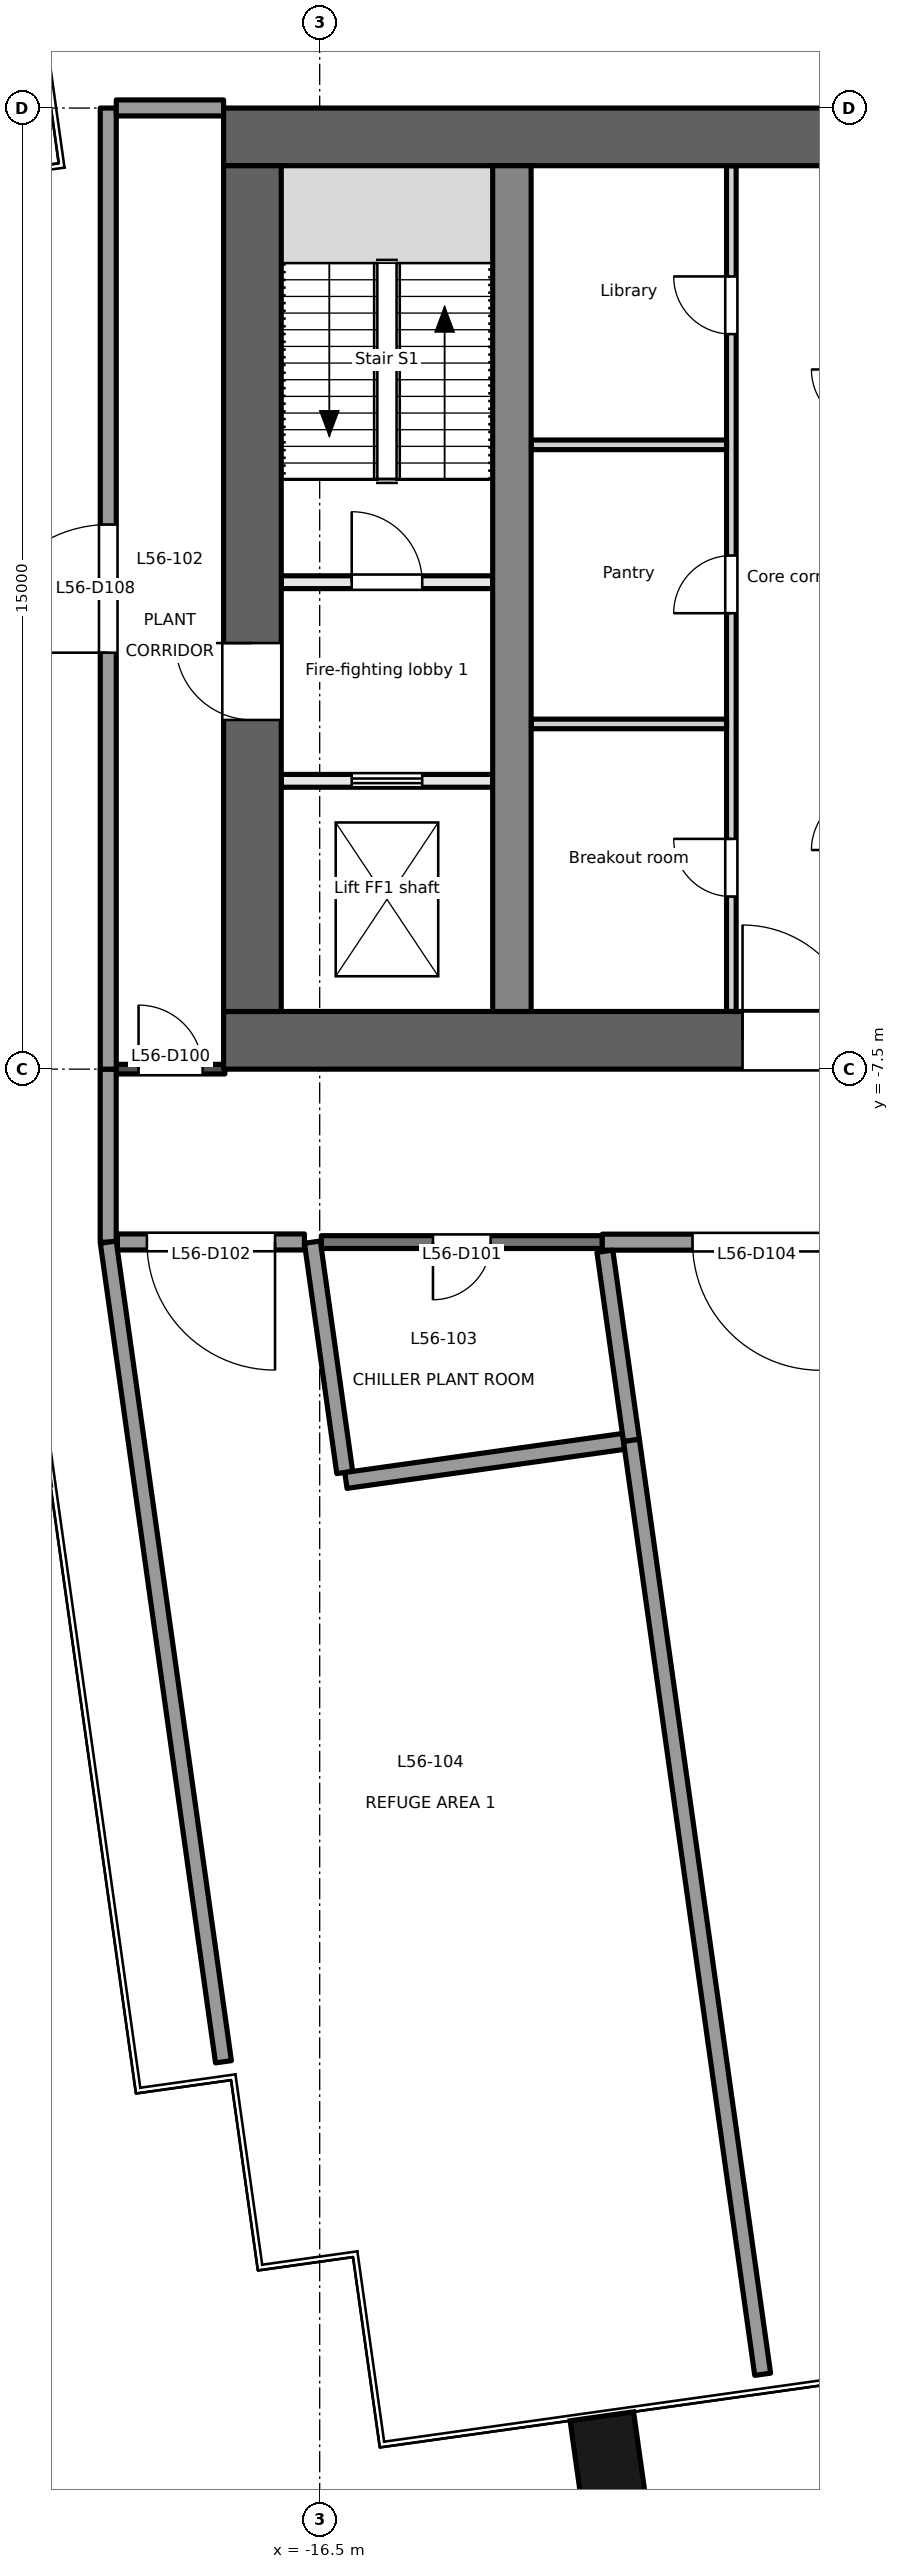
"""IFC4 building model, lengths in metres.
Left out: names, types, materials, properties, quantities, classifications, styles, units other than length and angle.
Written with IfcOpenShell. Run it as: python <this file> out.ifc"""

import sys

from ifc_helpers import new_model, si_unit, direction, frame, frame_2d, origin, origin_2d, place, context, subcontext, project, spatial, rectangle, extrude, element, fill, save


model = new_model("IFC4")
c1 = context("Model", 3, precision=1e-05, world=origin(), true_north=direction((0.0, 1.0)))
c2 = subcontext(c1, "Body", "Model", "MODEL_VIEW")
j1 = project(units=[si_unit("LENGTHUNIT", "METRE"), si_unit("PLANEANGLEUNIT", "RADIAN")], contexts=[c1])
p1 = place(None, origin())
s1 = spatial("IfcSite", under=j1, at=p1, CompositionType="ELEMENT")
p2 = place(p1, origin())
s2 = spatial("IfcBuilding", under=s1, at=p2, CompositionType="ELEMENT")
p3 = place(p2, frame((0.0, 0.0, 244.7)))
s3 = spatial("IfcBuildingStorey", under=s2, at=p3, CompositionType="ELEMENT", Elevation=244.7)
p4 = place(p3, frame((-11.971, -29.416, -0.2), z_axis=(0.0, 0.0, 1.0), x_axis=(0.990268068742, 0.13917310096, 0.0)))
e1 = element("IfcColumn", 1, at=p4, inside=s3, PredefinedType="COLUMN", context=c2, shape_type="SweptSolid", body=[
    extrude(rectangle(XDim=1.0, YDim=1.8, at=origin_2d()), origin(), (0.0, 0.0, 1.0), 5.0),
])
p5 = place(p3, frame((-18.0, -7.05, -0.2), z_axis=(0.0, 0.0, 1.0), x_axis=(1.0, 0.0, 0.0)))
e2 = element("IfcWall", 2, at=p5, inside=s3, PredefinedType="SHEAR", context=c2, shape_type="SweptSolid", body=[
    extrude(rectangle(XDim=36.0, YDim=0.9, at=frame_2d((18.0, 0.0))), origin(), (0.0, 0.0, 1.0), 5.0),
])
p6 = place(p5, frame((8.1, 0.0, 0.2)))
e3 = element("IfcOpeningElement", 3, at=p6, cuts=e2, PredefinedType="OPENING", context=c2, shape_type="SweptSolid", body=[
    extrude(rectangle(XDim=1.8, YDim=2.1, at=frame_2d((0.9, 1.05))), frame((0.0, 0.46, 0.0), z_axis=(0.0, -1.0, 0.0), x_axis=(1.0, 0.0, 0.0)), (0.0, 0.0, 1.0), 0.921),
])
p7 = place(p5, frame((16.8, 0.0, 0.2)))
e4 = element("IfcOpeningElement", 4, at=p7, cuts=e2, PredefinedType="OPENING", context=c2, shape_type="SweptSolid", body=[
    extrude(rectangle(XDim=2.4, YDim=2.1, at=frame_2d((1.2, 1.05))), frame((0.0, 0.46, 0.0), z_axis=(0.0, -1.0, 0.0), x_axis=(1.0, 0.0, 0.0)), (0.0, 0.0, 1.0), 0.921),
])
p8 = place(p5, frame((26.1, 0.0, 0.2)))
e5 = element("IfcOpeningElement", 5, at=p8, cuts=e2, PredefinedType="OPENING", context=c2, shape_type="SweptSolid", body=[
    extrude(rectangle(XDim=2.4, YDim=2.1, at=frame_2d((1.2, 1.05))), frame((0.0, 0.46, 0.0), z_axis=(0.0, -1.0, 0.0), x_axis=(1.0, 0.0, 0.0)), (0.0, 0.0, 1.0), 0.921),
])
p9 = place(p3, frame((-18.0, 7.05, -0.2), z_axis=(0.0, 0.0, 1.0), x_axis=(1.0, 0.0, 0.0)))
e6 = element("IfcWall", 6, at=p9, inside=s3, PredefinedType="SHEAR", context=c2, shape_type="SweptSolid", body=[
    extrude(rectangle(XDim=36.0, YDim=0.9, at=frame_2d((18.0, 0.0))), origin(), (0.0, 0.0, 1.0), 5.0),
])
p10 = place(p3, frame((-17.55, -6.6, -0.2), z_axis=(0.0, 0.0, 1.0), x_axis=(0.0, 1.0, 0.0)))
e7 = element("IfcWall", 7, at=p10, inside=s3, PredefinedType="SHEAR", context=c2, shape_type="SweptSolid", body=[
    extrude(rectangle(XDim=13.2, YDim=0.9, at=frame_2d((6.6, 0.0))), origin(), (0.0, 0.0, 1.0), 5.0),
])
p11 = place(p10, frame((4.55, 0.0, 0.2)))
e8 = element("IfcOpeningElement", 8, at=p11, cuts=e7, PredefinedType="OPENING", context=c2, shape_type="SweptSolid", body=[
    extrude(rectangle(XDim=1.2, YDim=2.1, at=frame_2d((0.6, 1.05))), frame((0.0, 0.46, 0.0), z_axis=(0.0, -1.0, 0.0), x_axis=(1.0, 0.0, 0.0)), (0.0, 0.0, 1.0), 0.921),
])
p12 = place(p3, frame((-13.5, -6.6, -0.2), z_axis=(0.0, 0.0, 1.0), x_axis=(0.0, 1.0, 0.0)))
e9 = element("IfcWall", 9, at=p12, inside=s3, PredefinedType="SHEAR", context=c2, shape_type="SweptSolid", body=[
    extrude(rectangle(XDim=13.2, YDim=0.6, at=frame_2d((6.6, 0.0))), origin(), (0.0, 0.0, 1.0), 5.0),
])
p13 = place(p3, frame((-17.1, -3.0, 0.0), z_axis=(0.0, 0.0, 1.0), x_axis=(1.0, 0.0, 0.0)))
e10 = element("IfcWall", 10, at=p13, inside=s3, PredefinedType="PARTITIONING", context=c2, shape_type="SweptSolid", body=[
    extrude(rectangle(XDim=3.3, YDim=0.2, at=frame_2d((1.65, 0.0))), origin(), (0.0, 0.0, 1.0), 4.8),
])
p14 = place(p13, frame((1.1, 0.0, 0.0)))
e11 = element("IfcOpeningElement", 11, at=p14, cuts=e10, PredefinedType="OPENING", context=c2, shape_type="SweptSolid", body=[
    extrude(rectangle(XDim=1.1, YDim=2.1, at=frame_2d((0.55, 1.05))), frame((0.0, 0.111, 0.0), z_axis=(0.0, -1.0, 0.0), x_axis=(1.0, 0.0, 0.0)), (0.0, 0.0, 1.0), 0.221),
])
p15 = place(p3, frame((-17.1, 0.1, 0.0), z_axis=(0.0, 0.0, 1.0), x_axis=(1.0, 0.0, 0.0)))
e12 = element("IfcWall", 12, at=p15, inside=s3, PredefinedType="PARTITIONING", context=c2, shape_type="SweptSolid", body=[
    extrude(rectangle(XDim=3.3, YDim=0.2, at=frame_2d((1.65, 0.0))), origin(), (0.0, 0.0, 1.0), 4.8),
])
p16 = place(p15, frame((1.1, 0.0, 0.0)))
e13 = element("IfcOpeningElement", 13, at=p16, cuts=e12, PredefinedType="OPENING", context=c2, shape_type="SweptSolid", body=[
    extrude(rectangle(XDim=1.1, YDim=2.1, at=frame_2d((0.55, 1.05))), frame((0.0, 0.111, 0.0), z_axis=(0.0, -1.0, 0.0), x_axis=(1.0, 0.0, 0.0)), (0.0, 0.0, 1.0), 0.221),
])
p17 = place(p3, frame((-10.075, -6.6, 0.0), z_axis=(0.0, 0.0, 1.0), x_axis=(0.0, 1.0, 0.0)))
e14 = element("IfcWall", 14, at=p17, inside=s3, PredefinedType="PARTITIONING", context=c2, shape_type="SweptSolid", body=[
    extrude(rectangle(XDim=13.2, YDim=0.15, at=frame_2d((6.6, 0.0))), origin(), (0.0, 0.0, 1.0), 4.8),
])
p18 = place(p17, frame((1.794, 0.0, 0.0)))
e15 = element("IfcOpeningElement", 15, at=p18, cuts=e14, PredefinedType="OPENING", context=c2, shape_type="SweptSolid", body=[
    extrude(rectangle(XDim=0.9, YDim=2.1, at=frame_2d((0.45, 1.05))), frame((0.0, 0.085, 0.0), z_axis=(0.0, -1.0, 0.0), x_axis=(1.0, 0.0, 0.0)), (0.0, 0.0, 1.0), 0.171),
])
p19 = place(p17, frame((6.216, 0.0, 0.0)))
e16 = element("IfcOpeningElement", 16, at=p19, cuts=e14, PredefinedType="OPENING", context=c2, shape_type="SweptSolid", body=[
    extrude(rectangle(XDim=0.9, YDim=2.1, at=frame_2d((0.45, 1.05))), frame((0.0, 0.085, 0.0), z_axis=(0.0, -1.0, 0.0), x_axis=(1.0, 0.0, 0.0)), (0.0, 0.0, 1.0), 0.171),
])
p20 = place(p17, frame((10.572, 0.0, 0.0)))
e17 = element("IfcOpeningElement", 17, at=p20, cuts=e14, PredefinedType="OPENING", context=c2, shape_type="SweptSolid", body=[
    extrude(rectangle(XDim=0.9, YDim=2.1, at=frame_2d((0.45, 1.05))), frame((0.0, 0.085, 0.0), z_axis=(0.0, -1.0, 0.0), x_axis=(1.0, 0.0, 0.0)), (0.0, 0.0, 1.0), 0.171),
])
for number, where, z_axis, x_axis in (
    (18, (-13.2, -2.112, 0.0), (0.0, 0.0, 1.0), (1.0, 0.0, 0.0)),
    (19, (-13.2, 2.244, 0.0), (0.0, 0.0, 1.0), (1.0, 0.0, 0.0)),
):
    element("IfcWall", number, at=place(p3, frame(where, z_axis=z_axis, x_axis=x_axis)), inside=s3, PredefinedType="PARTITIONING", context=c2, shape_type="SweptSolid", body=[
        extrude(rectangle(XDim=3.05, YDim=0.15, at=frame_2d((1.525, 0.0))), origin(), (0.0, 0.0, 1.0), 4.8),
    ])
p21 = place(p3, frame((-19.675, -7.5, 0.0), z_axis=(0.0, 0.0, 1.0), x_axis=(1.0, 0.0, 0.0)))
e20 = element("IfcWall", 20, at=p21, inside=s3, PredefinedType="PARTITIONING", context=c2, shape_type="SweptSolid", body=[
    extrude(rectangle(XDim=1.695, YDim=0.15, at=frame_2d((0.848, 0.0))), origin(), (0.0, 0.0, 1.0), 4.8),
])
p22 = place(p21, frame((0.348, 0.0, 0.0)))
e21 = element("IfcOpeningElement", 21, at=p22, cuts=e20, PredefinedType="OPENING", context=c2, shape_type="SweptSolid", body=[
    extrude(rectangle(XDim=1.0, YDim=2.1, at=frame_2d((0.5, 1.05))), frame((0.0, 0.085, 0.0), z_axis=(0.0, -1.0, 0.0), x_axis=(1.0, 0.0, 0.0)), (0.0, 0.0, 1.0), 0.171),
])
p23 = place(p3, frame((-12.089, -10.199, 0.0), z_axis=(0.0, 0.0, 1.0), x_axis=(-1.0, 0.0, 0.0)))
e22 = element("IfcWall", 22, at=p23, inside=s3, PredefinedType="PARTITIONING", context=c2, shape_type="SweptSolid", body=[
    extrude(rectangle(XDim=4.385, YDim=0.2, at=frame_2d((2.192, 0.0))), origin(), (0.0, 0.0, 1.0), 3.9),
])
p24 = place(p23, frame((1.743, 0.0, 0.0)))
e23 = element("IfcOpeningElement", 23, at=p24, cuts=e22, PredefinedType="OPENING", context=c2, shape_type="SweptSolid", body=[
    extrude(rectangle(XDim=0.9, YDim=2.1, at=frame_2d((0.45, 1.05))), frame((0.0, 0.111, 0.0), z_axis=(0.0, -1.0, 0.0), x_axis=(1.0, 0.0, 0.0)), (0.0, 0.0, 1.0), 0.221),
])
p25 = place(p3, frame((-16.738, -10.197, 0.0), z_axis=(0.0, 0.0, 1.0), x_axis=(-1.0, 0.0, 0.0)))
e24 = element("IfcWall", 24, at=p25, inside=s3, PredefinedType="PARTITIONING", context=c2, shape_type="SweptSolid", body=[
    extrude(rectangle(XDim=2.919, YDim=0.25, at=frame_2d((1.459, 0.0))), origin(), (0.0, 0.0, 1.0), 4.8),
])
p26 = place(p25, frame((0.459, 0.0, 0.0)))
e25 = element("IfcOpeningElement", 25, at=p26, cuts=e24, PredefinedType="OPENING", context=c2, shape_type="SweptSolid", body=[
    extrude(rectangle(XDim=2.0, YDim=2.1, at=frame_2d((1.0, 1.05))), frame((0.0, 0.135, 0.0), z_axis=(0.0, -1.0, 0.0), x_axis=(1.0, 0.0, 0.0)), (0.0, 0.0, 1.0), 0.271),
])
p27 = place(p3, frame((-7.272, -10.2, 0.0), z_axis=(0.0, 0.0, 1.0), x_axis=(-1.0, 0.0, 0.0)))
e26 = element("IfcWall", 26, at=p27, inside=s3, PredefinedType="PARTITIONING", context=c2, shape_type="SweptSolid", body=[
    extrude(rectangle(XDim=4.817, YDim=0.25, at=frame_2d((2.409, 0.0))), origin(), (0.0, 0.0, 1.0), 3.9),
])
p28 = place(p27, frame((1.409, 0.0, 0.0)))
e27 = element("IfcOpeningElement", 27, at=p28, cuts=e26, PredefinedType="OPENING", context=c2, shape_type="SweptSolid", body=[
    extrude(rectangle(XDim=2.0, YDim=2.1, at=frame_2d((1.0, 1.05))), frame((0.0, 0.135, 0.0), z_axis=(0.0, -1.0, 0.0), x_axis=(1.0, 0.0, 0.0)), (0.0, 0.0, 1.0), 0.271),
])
p29 = place(p3, frame((-19.801, -10.2, 0.0), z_axis=(0.0, 0.0, 1.0), x_axis=(0.0, 1.0, 0.0)))
e28 = element("IfcWall", 28, at=p29, inside=s3, PredefinedType="PARTITIONING", context=c2, shape_type="SweptSolid", body=[
    extrude(rectangle(XDim=2.7, YDim=0.25, at=frame_2d((1.35, 0.0))), origin(), (0.0, 0.0, 1.0), 4.8),
])
p30 = place(p3, frame((-19.8, -7.5, 0.0), z_axis=(0.0, 0.0, 1.0), x_axis=(0.0, 1.0, 0.0)))
e29 = element("IfcWall", 29, at=p30, inside=s3, PredefinedType="PARTITIONING", context=c2, shape_type="SweptSolid", body=[
    extrude(rectangle(XDim=15.0, YDim=0.25, at=frame_2d((7.5, 0.0))), origin(), (0.0, 0.0, 1.0), 4.44),
])
p31 = place(p30, frame((6.5, 0.0, 0.0)))
e30 = element("IfcOpeningElement", 30, at=p31, cuts=e29, PredefinedType="OPENING", context=c2, shape_type="SweptSolid", body=[
    extrude(rectangle(XDim=2.0, YDim=2.1, at=frame_2d((1.0, 1.05))), frame((0.0, 0.135, 0.0), z_axis=(0.0, -1.0, 0.0), x_axis=(1.0, 0.0, 0.0)), (0.0, 0.0, 1.0), 0.271),
])
p32 = place(p3, frame((-19.675, 7.502, 0.0), z_axis=(0.0, 0.0, 1.0), x_axis=(1.0, 0.0, 0.0)))
e31 = element("IfcWall", 31, at=p32, inside=s3, PredefinedType="PARTITIONING", context=c2, shape_type="SweptSolid", body=[
    extrude(rectangle(XDim=1.675, YDim=0.25, at=frame_2d((0.837, 0.0))), origin(), (0.0, 0.0, 1.0), 4.8),
])
p33 = place(p3, frame((-16.109, -13.795, 0.0), z_axis=(0.0, 0.0, 1.0), x_axis=(-0.139142514574, 0.990272366896, 0.0)))
e32 = element("IfcWall", 32, at=p33, inside=s3, PredefinedType="PARTITIONING", context=c2, shape_type="SweptSolid", body=[
    extrude(rectangle(XDim=3.63, YDim=0.25, at=frame_2d((1.815, 0.0))), origin(), (0.0, 0.0, 1.0), 4.8),
])
p34 = place(p3, frame((-11.758, -13.31, 0.0), z_axis=(0.0, 0.0, 1.0), x_axis=(-0.990270519577, -0.139155661248, 0.0)))
e33 = element("IfcWall", 33, at=p34, inside=s3, PredefinedType="PARTITIONING", context=c2, shape_type="SweptSolid", body=[
    extrude(rectangle(XDim=4.375, YDim=0.25, at=frame_2d((2.188, 0.0))), origin(), (0.0, 0.0, 1.0), 3.9),
])
p35 = place(p3, frame((-12.049, -10.342, 0.0), z_axis=(0.0, 0.0, 1.0), x_axis=(0.139230988623, -0.990259931436, 0.0)))
e34 = element("IfcWall", 34, at=p35, inside=s3, PredefinedType="PARTITIONING", context=c2, shape_type="SweptSolid", body=[
    extrude(rectangle(XDim=2.981, YDim=0.25, at=frame_2d((1.49, 0.0))), origin(), (0.0, 0.0, 1.0), 4.8),
])
p36 = place(p3, frame((-11.634, -13.294, 0.0), z_axis=(0.0, 0.0, 1.0), x_axis=(0.139154438601, -0.990270691386, 0.0)))
e35 = element("IfcWall", 35, at=p36, inside=s3, PredefinedType="PARTITIONING", context=c2, shape_type="SweptSolid", body=[
    extrude(rectangle(XDim=14.718, YDim=0.25, at=frame_2d((7.359, 0.0))), origin(), (0.0, 0.0, 1.0), 3.7),
])
p37 = place(p3, frame((-18.002, -22.992, 0.0), z_axis=(0.0, 0.0, 1.0), x_axis=(-0.139195756807, 0.990264884406, 0.0)))
e36 = element("IfcWall", 36, at=p37, inside=s3, PredefinedType="PARTITIONING", context=c2, shape_type="SweptSolid", body=[
    extrude(rectangle(XDim=12.918, YDim=0.25, at=frame_2d((6.459, 0.0))), origin(), (0.0, 0.0, 1.0), 4.8),
])
p38 = place(p14, origin())
e37 = element("IfcDoor", 37, at=p38, inside=s3, OperationType="DOUBLE_DOOR_SLIDING", PredefinedType="DOOR", context=c2, shape_type="SweptSolid", body=[
    extrude(rectangle(XDim=1.1, YDim=2.1, at=frame_2d((0.55, 1.05))), frame((0.0, 0.025, 0.0), z_axis=(0.0, -1.0, 0.0), x_axis=(1.0, 0.0, 0.0)), (0.0, 0.0, 1.0), 0.05),
])
fill(e11, e37)
p39 = place(p11, origin())
e38 = element("IfcDoor", 38, at=p39, inside=s3, OperationType="SINGLE_SWING_RIGHT", PredefinedType="DOOR", context=c2, shape_type="SweptSolid", body=[
    extrude(rectangle(XDim=1.2, YDim=2.1, at=frame_2d((0.6, 1.05))), frame((0.0, 0.025, 0.0), z_axis=(0.0, -1.0, 0.0), x_axis=(1.0, 0.0, 0.0)), (0.0, 0.0, 1.0), 0.05),
])
fill(e8, e38)
p40 = place(p16, origin())
e39 = element("IfcDoor", 39, at=p40, inside=s3, OperationType="SINGLE_SWING_LEFT", PredefinedType="DOOR", context=c2, shape_type="SweptSolid", body=[
    extrude(rectangle(XDim=1.1, YDim=2.1, at=frame_2d((0.55, 1.05))), frame((0.0, 0.025, 0.0), z_axis=(0.0, -1.0, 0.0), x_axis=(1.0, 0.0, 0.0)), (0.0, 0.0, 1.0), 0.05),
])
fill(e13, e39)
p41 = place(p18, origin())
e40 = element("IfcDoor", 40, at=p41, inside=s3, OperationType="SINGLE_SWING_RIGHT", PredefinedType="DOOR", context=c2, shape_type="SweptSolid", body=[
    extrude(rectangle(XDim=0.9, YDim=2.1, at=frame_2d((0.45, 1.05))), frame((0.0, 0.025, 0.0), z_axis=(0.0, -1.0, 0.0), x_axis=(1.0, 0.0, 0.0)), (0.0, 0.0, 1.0), 0.05),
])
fill(e15, e40)
p42 = place(p19, origin())
e41 = element("IfcDoor", 41, at=p42, inside=s3, OperationType="SINGLE_SWING_LEFT", PredefinedType="DOOR", context=c2, shape_type="SweptSolid", body=[
    extrude(rectangle(XDim=0.9, YDim=2.1, at=frame_2d((0.45, 1.05))), frame((0.0, 0.025, 0.0), z_axis=(0.0, -1.0, 0.0), x_axis=(1.0, 0.0, 0.0)), (0.0, 0.0, 1.0), 0.05),
])
fill(e16, e41)
p43 = place(p20, origin())
e42 = element("IfcDoor", 42, at=p43, inside=s3, OperationType="SINGLE_SWING_RIGHT", PredefinedType="DOOR", context=c2, shape_type="SweptSolid", body=[
    extrude(rectangle(XDim=0.9, YDim=2.1, at=frame_2d((0.45, 1.05))), frame((0.0, 0.025, 0.0), z_axis=(0.0, -1.0, 0.0), x_axis=(1.0, 0.0, 0.0)), (0.0, 0.0, 1.0), 0.05),
])
fill(e17, e42)
p44 = place(p6, origin())
e43 = element("IfcDoor", 43, at=p44, inside=s3, OperationType="SINGLE_SWING_LEFT", PredefinedType="DOOR", context=c2, shape_type="SweptSolid", body=[
    extrude(rectangle(XDim=1.8, YDim=2.1, at=frame_2d((0.9, 1.05))), frame((0.0, 0.025, 0.0), z_axis=(0.0, -1.0, 0.0), x_axis=(1.0, 0.0, 0.0)), (0.0, 0.0, 1.0), 0.05),
])
fill(e3, e43)
p45 = place(p22, origin())
e44 = element("IfcDoor", 44, at=p45, inside=s3, OperationType="SINGLE_SWING_LEFT", PredefinedType="DOOR", context=c2, shape_type="SweptSolid", body=[
    extrude(rectangle(XDim=1.0, YDim=2.1, at=frame_2d((0.5, 1.05))), frame((0.0, 0.025, 0.0), z_axis=(0.0, -1.0, 0.0), x_axis=(1.0, 0.0, 0.0)), (0.0, 0.0, 1.0), 0.05),
])
fill(e21, e44)
p46 = place(p24, origin())
e45 = element("IfcDoor", 45, at=p46, inside=s3, OperationType="SINGLE_SWING_RIGHT", PredefinedType="DOOR", context=c2, shape_type="SweptSolid", body=[
    extrude(rectangle(XDim=0.9, YDim=2.1, at=frame_2d((0.45, 1.05))), frame((0.0, 0.025, 0.0), z_axis=(0.0, -1.0, 0.0), x_axis=(1.0, 0.0, 0.0)), (0.0, 0.0, 1.0), 0.05),
])
fill(e23, e45)
p47 = place(p26, origin())
e46 = element("IfcDoor", 46, at=p47, inside=s3, OperationType="DOUBLE_DOOR_SINGLE_SWING", PredefinedType="DOOR", context=c2, shape_type="SweptSolid", body=[
    extrude(rectangle(XDim=2.0, YDim=2.1, at=frame_2d((1.0, 1.05))), frame((0.0, 0.025, 0.0), z_axis=(0.0, -1.0, 0.0), x_axis=(1.0, 0.0, 0.0)), (0.0, 0.0, 1.0), 0.05),
])
fill(e25, e46)
p48 = place(p28, origin())
e47 = element("IfcDoor", 47, at=p48, inside=s3, OperationType="DOUBLE_DOOR_SINGLE_SWING", PredefinedType="DOOR", context=c2, shape_type="SweptSolid", body=[
    extrude(rectangle(XDim=2.0, YDim=2.1, at=frame_2d((1.0, 1.05))), frame((0.0, 0.025, 0.0), z_axis=(0.0, -1.0, 0.0), x_axis=(1.0, 0.0, 0.0)), (0.0, 0.0, 1.0), 0.05),
])
fill(e27, e47)
p49 = place(p31, origin())
e48 = element("IfcDoor", 48, at=p49, inside=s3, OperationType="DOUBLE_DOOR_SINGLE_SWING", PredefinedType="DOOR", context=c2, shape_type="SweptSolid", body=[
    extrude(rectangle(XDim=2.0, YDim=2.1, at=frame_2d((1.0, 1.05))), frame((0.0, 0.025, 0.0), z_axis=(0.0, -1.0, 0.0), x_axis=(1.0, 0.0, 0.0)), (0.0, 0.0, 1.0), 0.05),
])
fill(e30, e48)
save(model, sys.argv[1])
